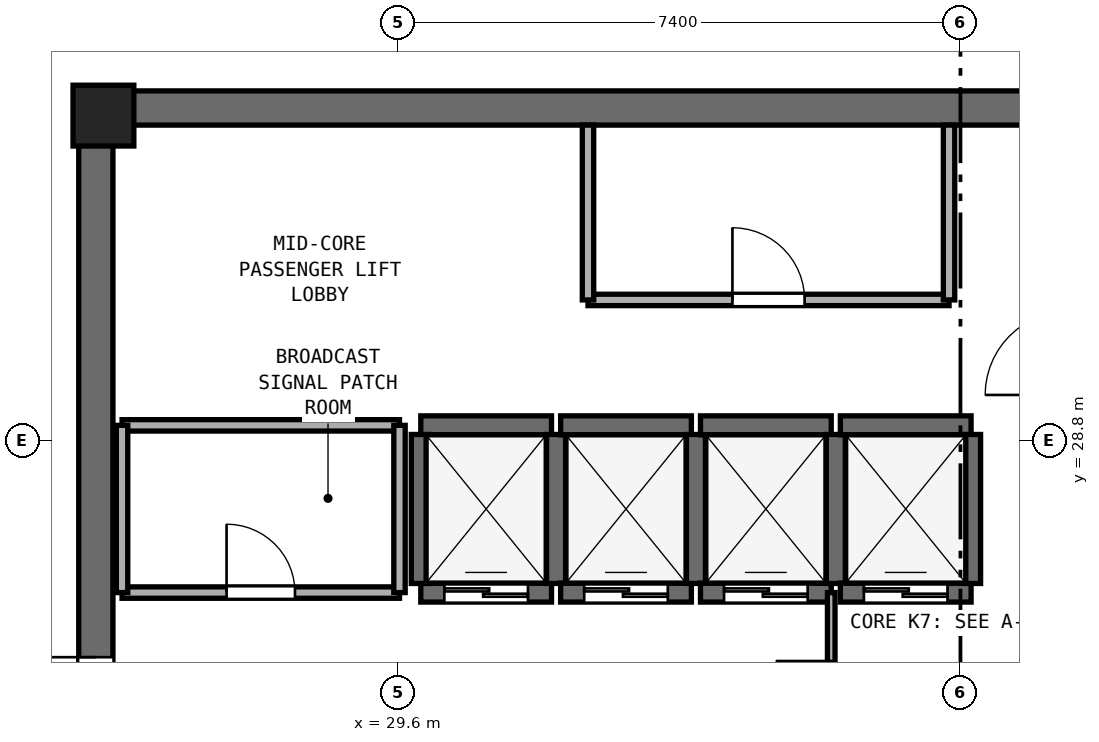
"""IFC4 building model, lengths in metres.
Left out: names, types, materials, properties, quantities, classifications, styles, units other than length and angle.
Written with IfcOpenShell. Run it as: python <this file> out.ifc"""

import sys

from ifc_helpers import new_model, si_unit, direction, frame, frame_2d, origin, origin_2d, place, context, subcontext, project, spatial, rectangle, extrude, element, fill, save


model = new_model("IFC4")
c1 = context("Model", 3, precision=1e-05, world=origin(), true_north=direction((0.0, 1.0)))
c2 = subcontext(c1, "Body", "Model", "MODEL_VIEW")
j1 = project(units=[si_unit("LENGTHUNIT", "METRE"), si_unit("PLANEANGLEUNIT", "RADIAN")], contexts=[c1])
p1 = place(None, origin())
s1 = spatial("IfcSite", under=j1, at=p1, CompositionType="ELEMENT")
p2 = place(p1, origin())
s2 = spatial("IfcBuilding", under=s1, at=p2, CompositionType="ELEMENT")
p3 = place(p2, frame((0.0, 0.0, 263.0)))
s3 = spatial("IfcBuildingStorey", under=s2, at=p3, CompositionType="ELEMENT", Elevation=263.0)
p4 = place(p3, frame((25.4, 33.175, 0.0), z_axis=(0.0, 0.0, 1.0), x_axis=(1.0, 0.0, 0.0)))
e1 = element("IfcWall", 1, at=p4, inside=s3, PredefinedType="SHEAR", context=c2, shape_type="SweptSolid", body=[
    extrude(rectangle(XDim=23.2, YDim=0.45, at=frame_2d((11.6, 0.0))), origin(), (0.0, 0.0, 1.0), 3.51),
])
p5 = place(p3, frame((25.625, 17.45, 0.0), z_axis=(0.0, 0.0, 1.0), x_axis=(0.0, 1.0, 0.0)))
e2 = element("IfcWall", 2, at=p5, inside=s3, PredefinedType="SHEAR", context=c2, shape_type="SweptSolid", body=[
    extrude(rectangle(XDim=15.5, YDim=0.45, at=frame_2d((7.75, 0.0))), origin(), (0.0, 0.0, 1.0), 3.51),
])
p6 = place(p5, frame((7.0, 0.0, 0.0)))
e3 = element("IfcOpeningElement", 3, at=p6, cuts=e2, PredefinedType="OPENING", context=c2, shape_type="SweptSolid", body=[
    extrude(rectangle(XDim=1.5, YDim=2.15, at=frame_2d((0.75, 1.075))), frame((0.0, 0.235, 0.0), z_axis=(0.0, -1.0, 0.0), x_axis=(1.0, 0.0, 0.0)), (0.0, 0.0, 1.0), 0.47),
])
p7 = place(p3, frame((25.725, 33.075, 0.0), z_axis=(0.0, 0.0, 1.0), x_axis=(1.0, 0.0, 0.0)))
e4 = element("IfcColumn", 4, at=p7, inside=s3, PredefinedType="PILASTER", context=c2, shape_type="SweptSolid", body=[
    extrude(rectangle(XDim=0.8, YDim=0.8, at=origin_2d()), origin(), (0.0, 0.0, 1.0), 3.8),
])
p8 = place(p3, frame((29.9, 26.8, 0.0), z_axis=(0.0, 0.0, 1.0), x_axis=(1.0, 0.0, 0.0)))
e5 = element("IfcWall", 5, at=p8, inside=s3, PredefinedType="SHEAR", context=c2, shape_type="SweptSolid", body=[
    extrude(rectangle(XDim=1.72, YDim=0.25, at=frame_2d((0.86, 0.0))), origin(), (0.0, 0.0, 1.0), 3.51),
])
p9 = place(p8, frame((0.31, 0.0, 0.0)))
e6 = element("IfcOpeningElement", 6, at=p9, cuts=e5, PredefinedType="OPENING", context=c2, shape_type="SweptSolid", body=[
    extrude(rectangle(XDim=1.1, YDim=2.15, at=frame_2d((0.55, 1.075))), frame((0.0, 0.135, 0.0), z_axis=(0.0, -1.0, 0.0), x_axis=(1.0, 0.0, 0.0)), (0.0, 0.0, 1.0), 0.27),
])
p10 = place(p3, frame((29.9, 29.0, 0.0), z_axis=(0.0, 0.0, 1.0), x_axis=(1.0, 0.0, 0.0)))
e7 = element("IfcWall", 7, at=p10, inside=s3, PredefinedType="SHEAR", context=c2, shape_type="SweptSolid", body=[
    extrude(rectangle(XDim=1.72, YDim=0.25, at=frame_2d((0.86, 0.0))), origin(), (0.0, 0.0, 1.0), 3.51),
])
for number, where, z_axis, x_axis in (
    (8, (29.9, 26.92, 0.0), (0.0, 0.0, 1.0), (0.0, 1.0, 0.0)),
    (9, (31.68, 26.92, 0.0), (0.0, 0.0, 1.0), (0.0, 1.0, 0.0)),
):
    element("IfcWall", number, at=place(p3, frame(where, z_axis=z_axis, x_axis=x_axis)), inside=s3, PredefinedType="SHEAR", context=c2, shape_type="SweptSolid", body=[
        extrude(rectangle(XDim=1.96, YDim=0.25, at=frame_2d((0.98, 0.0))), origin(), (0.0, 0.0, 1.0), 3.51),
    ])
p11 = place(p3, frame((31.74, 26.8, 0.0), z_axis=(0.0, 0.0, 1.0), x_axis=(1.0, 0.0, 0.0)))
e10 = element("IfcWall", 10, at=p11, inside=s3, PredefinedType="SHEAR", context=c2, shape_type="SweptSolid", body=[
    extrude(rectangle(XDim=1.72, YDim=0.25, at=frame_2d((0.86, 0.0))), origin(), (0.0, 0.0, 1.0), 3.51),
])
p12 = place(p11, frame((0.31, 0.0, 0.0)))
e11 = element("IfcOpeningElement", 11, at=p12, cuts=e10, PredefinedType="OPENING", context=c2, shape_type="SweptSolid", body=[
    extrude(rectangle(XDim=1.1, YDim=2.15, at=frame_2d((0.55, 1.075))), frame((0.0, 0.135, 0.0), z_axis=(0.0, -1.0, 0.0), x_axis=(1.0, 0.0, 0.0)), (0.0, 0.0, 1.0), 0.27),
])
p13 = place(p3, frame((31.74, 29.0, 0.0), z_axis=(0.0, 0.0, 1.0), x_axis=(1.0, 0.0, 0.0)))
e12 = element("IfcWall", 12, at=p13, inside=s3, PredefinedType="SHEAR", context=c2, shape_type="SweptSolid", body=[
    extrude(rectangle(XDim=1.72, YDim=0.25, at=frame_2d((0.86, 0.0))), origin(), (0.0, 0.0, 1.0), 3.51),
])
p14 = place(p3, frame((33.52, 26.92, 0.0), z_axis=(0.0, 0.0, 1.0), x_axis=(0.0, 1.0, 0.0)))
e13 = element("IfcWall", 13, at=p14, inside=s3, PredefinedType="SHEAR", context=c2, shape_type="SweptSolid", body=[
    extrude(rectangle(XDim=1.96, YDim=0.25, at=frame_2d((0.98, 0.0))), origin(), (0.0, 0.0, 1.0), 3.51),
])
p15 = place(p3, frame((33.58, 26.8, 0.0), z_axis=(0.0, 0.0, 1.0), x_axis=(1.0, 0.0, 0.0)))
e14 = element("IfcWall", 14, at=p15, inside=s3, PredefinedType="SHEAR", context=c2, shape_type="SweptSolid", body=[
    extrude(rectangle(XDim=1.72, YDim=0.25, at=frame_2d((0.86, 0.0))), origin(), (0.0, 0.0, 1.0), 3.51),
])
p16 = place(p15, frame((0.31, 0.0, 0.0)))
e15 = element("IfcOpeningElement", 15, at=p16, cuts=e14, PredefinedType="OPENING", context=c2, shape_type="SweptSolid", body=[
    extrude(rectangle(XDim=1.1, YDim=2.15, at=frame_2d((0.55, 1.075))), frame((0.0, 0.135, 0.0), z_axis=(0.0, -1.0, 0.0), x_axis=(1.0, 0.0, 0.0)), (0.0, 0.0, 1.0), 0.27),
])
p17 = place(p3, frame((33.58, 29.0, 0.0), z_axis=(0.0, 0.0, 1.0), x_axis=(1.0, 0.0, 0.0)))
e16 = element("IfcWall", 16, at=p17, inside=s3, PredefinedType="SHEAR", context=c2, shape_type="SweptSolid", body=[
    extrude(rectangle(XDim=1.72, YDim=0.25, at=frame_2d((0.86, 0.0))), origin(), (0.0, 0.0, 1.0), 3.51),
])
p18 = place(p3, frame((35.36, 26.92, 0.0), z_axis=(0.0, 0.0, 1.0), x_axis=(0.0, 1.0, 0.0)))
e17 = element("IfcWall", 17, at=p18, inside=s3, PredefinedType="SHEAR", context=c2, shape_type="SweptSolid", body=[
    extrude(rectangle(XDim=1.96, YDim=0.25, at=frame_2d((0.98, 0.0))), origin(), (0.0, 0.0, 1.0), 3.51),
])
p19 = place(p3, frame((35.42, 26.8, 0.0), z_axis=(0.0, 0.0, 1.0), x_axis=(1.0, 0.0, 0.0)))
e18 = element("IfcWall", 18, at=p19, inside=s3, PredefinedType="SHEAR", context=c2, shape_type="SweptSolid", body=[
    extrude(rectangle(XDim=1.72, YDim=0.25, at=frame_2d((0.86, 0.0))), origin(), (0.0, 0.0, 1.0), 3.51),
])
p20 = place(p19, frame((0.31, 0.0, 0.0)))
e19 = element("IfcOpeningElement", 19, at=p20, cuts=e18, PredefinedType="OPENING", context=c2, shape_type="SweptSolid", body=[
    extrude(rectangle(XDim=1.1, YDim=2.15, at=frame_2d((0.55, 1.075))), frame((0.0, 0.135, 0.0), z_axis=(0.0, -1.0, 0.0), x_axis=(1.0, 0.0, 0.0)), (0.0, 0.0, 1.0), 0.27),
])
p21 = place(p3, frame((35.42, 29.0, 0.0), z_axis=(0.0, 0.0, 1.0), x_axis=(1.0, 0.0, 0.0)))
e20 = element("IfcWall", 20, at=p21, inside=s3, PredefinedType="SHEAR", context=c2, shape_type="SweptSolid", body=[
    extrude(rectangle(XDim=1.72, YDim=0.25, at=frame_2d((0.86, 0.0))), origin(), (0.0, 0.0, 1.0), 3.51),
])
p22 = place(p3, frame((37.14, 26.92, 0.0), z_axis=(0.0, 0.0, 1.0), x_axis=(0.0, 1.0, 0.0)))
e21 = element("IfcWall", 21, at=p22, inside=s3, PredefinedType="SHEAR", context=c2, shape_type="SweptSolid", body=[
    extrude(rectangle(XDim=1.96, YDim=0.25, at=frame_2d((0.98, 0.0))), origin(), (0.0, 0.0, 1.0), 3.51),
])
p23 = place(p3, frame((32.1, 30.65, 0.0), z_axis=(0.0, 0.0, 1.0), x_axis=(1.0, 0.0, 0.0)))
e22 = element("IfcWall", 22, at=p23, inside=s3, PredefinedType="PARTITIONING", context=c2, shape_type="SweptSolid", body=[
    extrude(rectangle(XDim=4.75, YDim=0.15, at=frame_2d((2.375, 0.0))), origin(), (0.0, 0.0, 1.0), 3.51),
])
p24 = place(p23, frame((1.9, 0.0, 0.0)))
e23 = element("IfcOpeningElement", 23, at=p24, cuts=e22, PredefinedType="OPENING", context=c2, shape_type="SweptSolid", body=[
    extrude(rectangle(XDim=0.95, YDim=2.1, at=frame_2d((0.475, 1.05))), frame((0.0, 0.085, 0.0), z_axis=(0.0, -1.0, 0.0), x_axis=(1.0, 0.0, 0.0)), (0.0, 0.0, 1.0), 0.17),
])
for number, where, z_axis, x_axis in (
    (24, (32.1, 30.65, 0.0), (0.0, 0.0, 1.0), (0.0, 1.0, 0.0)),
    (25, (36.85, 30.65, 0.0), (0.0, 0.0, 1.0), (0.0, 1.0, 0.0)),
):
    element("IfcWall", number, at=place(p3, frame(where, z_axis=z_axis, x_axis=x_axis)), inside=s3, PredefinedType="PARTITIONING", context=c2, shape_type="SweptSolid", body=[
        extrude(rectangle(XDim=2.3, YDim=0.15, at=frame_2d((1.15, 0.0))), origin(), (0.0, 0.0, 1.0), 3.51),
    ])
p25 = place(p3, frame((25.97, 26.8, 0.0), z_axis=(0.0, 0.0, 1.0), x_axis=(1.0, 0.0, 0.0)))
e26 = element("IfcWall", 26, at=p25, inside=s3, PredefinedType="PARTITIONING", context=c2, shape_type="SweptSolid", body=[
    extrude(rectangle(XDim=3.65, YDim=0.15, at=frame_2d((1.825, 0.0))), origin(), (0.0, 0.0, 1.0), 3.51),
])
p26 = place(p25, frame((1.375, 0.0, 0.0)))
e27 = element("IfcOpeningElement", 27, at=p26, cuts=e26, PredefinedType="OPENING", context=c2, shape_type="SweptSolid", body=[
    extrude(rectangle(XDim=0.9, YDim=2.1, at=frame_2d((0.45, 1.05))), frame((0.0, 0.085, 0.0), z_axis=(0.0, -1.0, 0.0), x_axis=(1.0, 0.0, 0.0)), (0.0, 0.0, 1.0), 0.17),
])
p27 = place(p3, frame((25.97, 29.0, 0.0), z_axis=(0.0, 0.0, 1.0), x_axis=(1.0, 0.0, 0.0)))
e28 = element("IfcWall", 28, at=p27, inside=s3, PredefinedType="PARTITIONING", context=c2, shape_type="SweptSolid", body=[
    extrude(rectangle(XDim=3.65, YDim=0.15, at=frame_2d((1.825, 0.0))), origin(), (0.0, 0.0, 1.0), 3.51),
])
p28 = place(p3, frame((25.97, 26.8, 0.0), z_axis=(0.0, 0.0, 1.0), x_axis=(0.0, 1.0, 0.0)))
e29 = element("IfcWall", 29, at=p28, inside=s3, PredefinedType="PARTITIONING", context=c2, shape_type="SweptSolid", body=[
    extrude(rectangle(XDim=2.2, YDim=0.15, at=frame_2d((1.1, 0.0))), origin(), (0.0, 0.0, 1.0), 2.61),
])
p29 = place(p3, frame((29.62, 26.8, 0.0), z_axis=(0.0, 0.0, 1.0), x_axis=(0.0, 1.0, 0.0)))
e30 = element("IfcWall", 30, at=p29, inside=s3, PredefinedType="PARTITIONING", context=c2, shape_type="SweptSolid", body=[
    extrude(rectangle(XDim=2.2, YDim=0.15, at=frame_2d((1.1, 0.0))), origin(), (0.0, 0.0, 1.0), 3.51),
])
p30 = place(p3, frame((35.3, 23.6, 0.0), z_axis=(0.0, 0.0, 1.0), x_axis=(0.0, 1.0, 0.0)))
e31 = element("IfcWall", 31, at=p30, inside=s3, PredefinedType="PARTITIONING", context=c2, shape_type="SweptSolid", body=[
    extrude(rectangle(XDim=3.2, YDim=0.1, at=frame_2d((1.6, 0.0))), origin(), (0.0, 0.0, 1.0), 3.51),
])
p31 = place(p30, frame((0.85, 0.0, 0.0)))
e32 = element("IfcOpeningElement", 32, at=p31, cuts=e31, PredefinedType="OPENING", context=c2, shape_type="SweptSolid", body=[
    extrude(rectangle(XDim=1.45, YDim=2.12, at=frame_2d((0.725, 1.06))), frame((0.0, 0.06, 0.0), z_axis=(0.0, -1.0, 0.0), x_axis=(1.0, 0.0, 0.0)), (0.0, 0.0, 1.0), 0.12),
])
p32 = place(p9, origin())
e33 = element("IfcDoor", 33, at=p32, inside=s3, OperationType="DOUBLE_DOOR_SLIDING", PredefinedType="DOOR", context=c2, shape_type="SweptSolid", body=[
    extrude(rectangle(XDim=1.1, YDim=2.15, at=frame_2d((0.55, 1.075))), frame((0.0, 0.025, 0.0), z_axis=(0.0, -1.0, 0.0), x_axis=(1.0, 0.0, 0.0)), (0.0, 0.0, 1.0), 0.05),
])
fill(e6, e33)
p33 = place(p12, origin())
e34 = element("IfcDoor", 34, at=p33, inside=s3, OperationType="DOUBLE_DOOR_SLIDING", PredefinedType="DOOR", context=c2, shape_type="SweptSolid", body=[
    extrude(rectangle(XDim=1.1, YDim=2.15, at=frame_2d((0.55, 1.075))), frame((0.0, 0.025, 0.0), z_axis=(0.0, -1.0, 0.0), x_axis=(1.0, 0.0, 0.0)), (0.0, 0.0, 1.0), 0.05),
])
fill(e11, e34)
p34 = place(p16, origin())
e35 = element("IfcDoor", 35, at=p34, inside=s3, OperationType="DOUBLE_DOOR_SLIDING", PredefinedType="DOOR", context=c2, shape_type="SweptSolid", body=[
    extrude(rectangle(XDim=1.1, YDim=2.15, at=frame_2d((0.55, 1.075))), frame((0.0, 0.025, 0.0), z_axis=(0.0, -1.0, 0.0), x_axis=(1.0, 0.0, 0.0)), (0.0, 0.0, 1.0), 0.05),
])
fill(e15, e35)
p35 = place(p20, origin())
e36 = element("IfcDoor", 36, at=p35, inside=s3, OperationType="DOUBLE_DOOR_SLIDING", PredefinedType="DOOR", context=c2, shape_type="SweptSolid", body=[
    extrude(rectangle(XDim=1.1, YDim=2.15, at=frame_2d((0.55, 1.075))), frame((0.0, 0.025, 0.0), z_axis=(0.0, -1.0, 0.0), x_axis=(1.0, 0.0, 0.0)), (0.0, 0.0, 1.0), 0.05),
])
fill(e19, e36)
p36 = place(p6, origin())
e37 = element("IfcDoor", 37, at=p36, inside=s3, OperationType="DOUBLE_DOOR_SINGLE_SWING", PredefinedType="DOOR", context=c2, shape_type="SweptSolid", body=[
    extrude(rectangle(XDim=1.5, YDim=2.15, at=frame_2d((0.75, 1.075))), frame((0.0, 0.025, 0.0), z_axis=(0.0, -1.0, 0.0), x_axis=(1.0, 0.0, 0.0)), (0.0, 0.0, 1.0), 0.05),
])
fill(e3, e37)
p37 = place(p24, origin())
e38 = element("IfcDoor", 38, at=p37, inside=s3, OperationType="SINGLE_SWING_LEFT", PredefinedType="DOOR", context=c2, shape_type="SweptSolid", body=[
    extrude(rectangle(XDim=0.95, YDim=2.1, at=frame_2d((0.475, 1.05))), frame((0.0, 0.025, 0.0), z_axis=(0.0, -1.0, 0.0), x_axis=(1.0, 0.0, 0.0)), (0.0, 0.0, 1.0), 0.05),
])
fill(e23, e38)
p38 = place(p26, origin())
e39 = element("IfcDoor", 39, at=p38, inside=s3, OperationType="SINGLE_SWING_LEFT", PredefinedType="DOOR", context=c2, shape_type="SweptSolid", body=[
    extrude(rectangle(XDim=0.9, YDim=2.1, at=frame_2d((0.45, 1.05))), frame((0.0, 0.025, 0.0), z_axis=(0.0, -1.0, 0.0), x_axis=(1.0, 0.0, 0.0)), (0.0, 0.0, 1.0), 0.05),
])
fill(e27, e39)
p39 = place(p31, origin())
e40 = element("IfcDoor", 40, at=p39, inside=s3, OperationType="DOUBLE_DOOR_SINGLE_SWING", PredefinedType="DOOR", context=c2, shape_type="SweptSolid", body=[
    extrude(rectangle(XDim=1.45, YDim=2.12, at=frame_2d((0.725, 1.06))), frame((0.0, 0.025, 0.0), z_axis=(0.0, -1.0, 0.0), x_axis=(1.0, 0.0, 0.0)), (0.0, 0.0, 1.0), 0.05),
])
fill(e32, e40)
save(model, sys.argv[1])
